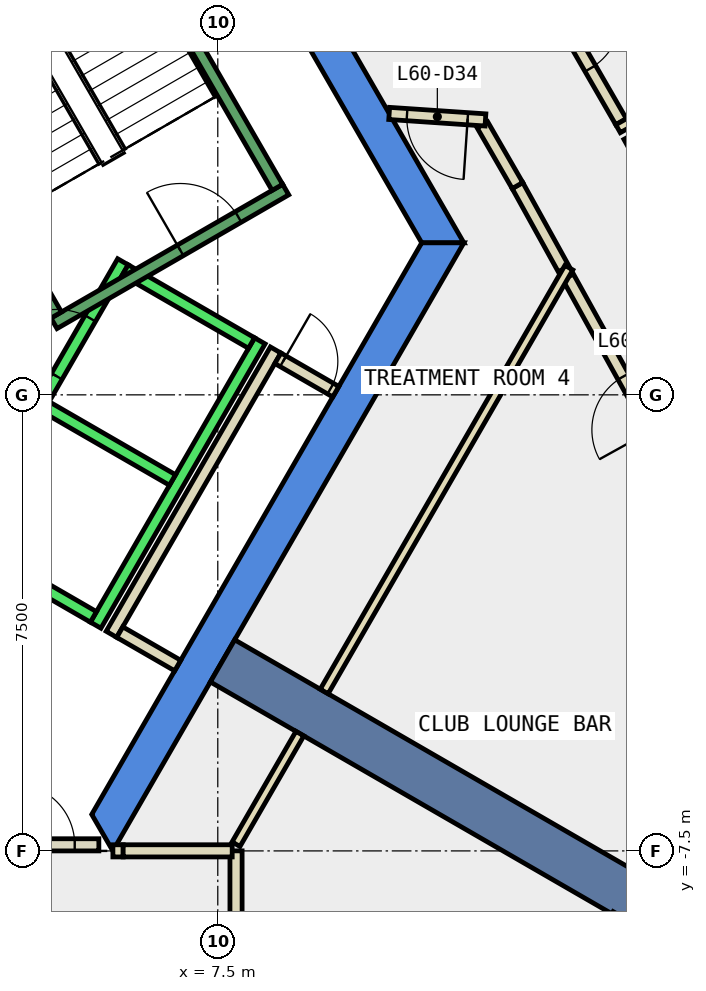
"""IFC4 building model, lengths in metres.
Left out: names, types, materials, properties, quantities, classifications, styles, units other than length and angle.
Written with IfcOpenShell. Run it as: python <this file> out.ifc"""

import sys

from ifc_helpers import new_model, si_unit, direction, frame, frame_2d, origin, place, context, subcontext, project, spatial, polyline, rectangle, outline, extrude, element, fill, save


model = new_model("IFC4")
c1 = context("Model", 3, precision=1e-05, world=origin(), true_north=direction((0.0, 1.0)))
c2 = subcontext(c1, "Body", "Model", "MODEL_VIEW")
j1 = project(units=[si_unit("LENGTHUNIT", "METRE"), si_unit("PLANEANGLEUNIT", "RADIAN")], contexts=[c1])
p1 = place(None, origin())
s1 = spatial("IfcSite", under=j1, at=p1, CompositionType="ELEMENT")
p2 = place(p1, origin())
s2 = spatial("IfcBuilding", under=s1, at=p2, CompositionType="ELEMENT")
p3 = place(p2, frame((0.0, 0.0, 263.0)))
s3 = spatial("IfcBuildingStorey", under=s2, at=p3, CompositionType="ELEMENT", Elevation=263.0)
p4 = place(p3, frame((0.0, 0.0, -0.34)))
e1 = element("IfcWall", 1, at=p4, inside=s3, PredefinedType="SHEAR", context=c2, shape_type="SweptSolid", body=[
    extrude(outline(polyline([(6.786, 10.747), (6.266, 10.447), (10.854, 2.5), (11.547, 2.5), (6.786, 10.747)])), origin(), (0.0, 0.0, 1.0), 3.6),
])
p5 = place(p3, frame((0.0, 0.0, -0.34)))
e2 = element("IfcWall", 2, at=p5, inside=s3, PredefinedType="SHEAR", context=c2, shape_type="SweptSolid", body=[
    extrude(outline(polyline([(5.774, -7.5), (11.547, 2.5), (10.854, 2.5), (5.427, -6.9), (5.774, -7.5)])), origin(), (0.0, 0.0, 1.0), 3.6),
])
p6 = place(p3, frame((7.578, -4.375, -0.34), z_axis=(0.0, 0.0, 1.0), x_axis=(0.866024315419, -0.5000018851, 0.0)))
e3 = element("IfcWall", 3, at=p6, inside=s3, PredefinedType="SHEAR", context=c2, shape_type="SweptSolid", body=[
    extrude(rectangle(XDim=9.0, YDim=0.8, at=frame_2d((4.5, 0.0))), origin(), (0.0, 0.0, 1.0), 3.6),
])
p7 = place(p3, frame((13.188, 2.071, 0.0), z_axis=(0.0, 0.0, 1.0), x_axis=(-0.484398936474, 0.874847226859, 0.0)))
e4 = element("IfcWall", 4, at=p7, inside=s3, PredefinedType="PARTITIONING", context=c2, shape_type="SweptSolid", body=[
    extrude(rectangle(XDim=1.567, YDim=0.2, at=frame_2d((0.783, 0.0))), origin(), (0.0, 0.0, 1.0), 3.26),
])
p8 = place(p3, frame((12.429, 3.442, 0.0), z_axis=(0.0, 0.0, 1.0), x_axis=(-0.500076612374, 0.865981167091, 0.0)))
e5 = element("IfcWall", 5, at=p8, inside=s3, PredefinedType="PARTITIONING", context=c2, shape_type="SweptSolid", body=[
    extrude(rectangle(XDim=1.154, YDim=0.2, at=frame_2d((0.577, 0.0))), origin(), (0.0, 0.0, 1.0), 3.26),
])
p9 = place(p3, frame((11.902, 4.521, 0.0), z_axis=(0.0, 0.0, 1.0), x_axis=(-0.997726217037, 0.067397298437, 0.0)))
e6 = element("IfcWall", 6, at=p9, inside=s3, PredefinedType="PARTITIONING", context=c2, shape_type="SweptSolid", body=[
    extrude(rectangle(XDim=1.587, YDim=0.2, at=frame_2d((0.793, 0.0))), origin(), (0.0, 0.0, 1.0), 3.26),
])
p10 = place(p9, frame((0.293, 0.0, 0.0)))
e7 = element("IfcOpeningElement", 7, at=p10, cuts=e6, PredefinedType="OPENING", context=c2, shape_type="SweptSolid", body=[
    extrude(rectangle(XDim=1.0, YDim=2.1, at=frame_2d((0.5, 1.05))), frame((0.0, 0.11, 0.0), z_axis=(0.0, -1.0, 0.0), x_axis=(1.0, 0.0, 0.0)), (0.0, 0.0, 1.0), 0.22),
])
p11 = place(p3, frame((15.56, -2.214, 0.0), z_axis=(0.0, 0.0, 1.0), x_axis=(-0.484323615817, 0.874888927329, 0.0)))
e8 = element("IfcWall", 8, at=p11, inside=s3, PredefinedType="PARTITIONING", context=c2, shape_type="SweptSolid", body=[
    extrude(rectangle(XDim=4.747, YDim=0.2, at=frame_2d((2.374, 0.0))), origin(), (0.0, 0.0, 1.0), 3.26),
])
p12 = place(p11, frame((1.874, 0.0, 0.0)))
e9 = element("IfcOpeningElement", 9, at=p12, cuts=e8, PredefinedType="OPENING", context=c2, shape_type="SweptSolid", body=[
    extrude(rectangle(XDim=1.0, YDim=2.1, at=frame_2d((0.5, 1.05))), frame((0.0, 0.11, 0.0), z_axis=(0.0, -1.0, 0.0), x_axis=(1.0, 0.0, 0.0)), (0.0, 0.0, 1.0), 0.22),
])
p13 = place(p3, frame((14.267, 4.25, 0.0), z_axis=(0.0, 0.0, 1.0), x_axis=(0.4843920198, -0.874851056554, 0.0)))
e10 = element("IfcWall", 10, at=p13, inside=s3, PredefinedType="PARTITIONING", context=c2, shape_type="SweptSolid", body=[
    extrude(rectangle(XDim=3.199, YDim=0.2, at=frame_2d((1.6, 0.0))), origin(), (0.0, 0.0, 1.0), 3.26),
])
p14 = place(p3, frame((12.62, 7.111, 0.0), z_axis=(0.0, 0.0, 1.0), x_axis=(0.499950733426, -0.866053845986, 0.0)))
e11 = element("IfcWall", 11, at=p14, inside=s3, PredefinedType="PARTITIONING", context=c2, shape_type="SweptSolid", body=[
    extrude(rectangle(XDim=3.024, YDim=0.2, at=frame_2d((1.512, 0.0))), origin(), (0.0, 0.0, 1.0), 3.26),
])
p15 = place(p14, frame((1.013, 0.0, 0.0)))
e12 = element("IfcOpeningElement", 12, at=p15, cuts=e11, PredefinedType="OPENING", context=c2, shape_type="SweptSolid", body=[
    extrude(rectangle(XDim=1.0, YDim=2.1, at=frame_2d((0.5, 1.05))), frame((0.0, 0.11, 0.0), z_axis=(0.0, -1.0, 0.0), x_axis=(1.0, 0.0, 0.0)), (0.0, 0.0, 1.0), 0.22),
])
p16 = place(p3, frame((5.751, -3.938, 0.0), z_axis=(0.0, 0.0, 1.0), x_axis=(0.500034260056, 0.866005622828, 0.0)))
e13 = element("IfcWall", 13, at=p16, inside=s3, PredefinedType="PARTITIONING", context=c2, shape_type="SweptSolid", body=[
    extrude(rectangle(XDim=5.399, YDim=0.2, at=frame_2d((2.7, 0.0))), origin(), (0.0, 0.0, 1.0), 3.26),
])
p17 = place(p3, frame((8.488, 0.602, 0.0), z_axis=(0.0, 0.0, 1.0), x_axis=(0.866063652425, -0.499933745558, 0.0)))
e14 = element("IfcWall", 14, at=p17, inside=s3, PredefinedType="PARTITIONING", context=c2, shape_type="SweptSolid", body=[
    extrude(rectangle(XDim=1.1, YDim=0.2, at=frame_2d((0.55, 0.0))), origin(), (0.0, 0.0, 1.0), 3.26),
])
p18 = place(p17, frame((0.1, 0.0, 0.0)))
e15 = element("IfcOpeningElement", 15, at=p18, cuts=e14, PredefinedType="OPENING", context=c2, shape_type="SweptSolid", body=[
    extrude(rectangle(XDim=0.9, YDim=2.1, at=frame_2d((0.45, 1.05))), frame((0.0, 0.11, 0.0), z_axis=(0.0, -1.0, 0.0), x_axis=(1.0, 0.0, 0.0)), (0.0, 0.0, 1.0), 0.22),
])
p19 = place(p3, frame((6.841, -4.452, 0.0), z_axis=(0.0, 0.0, 1.0), x_axis=(-0.86621513555, 0.499671230855, 0.0)))
e16 = element("IfcWall", 16, at=p19, inside=s3, PredefinedType="PARTITIONING", context=c2, shape_type="SweptSolid", body=[
    extrude(rectangle(XDim=1.1, YDim=0.2, at=frame_2d((0.55, 0.0))), origin(), (0.0, 0.0, 1.0), 3.26),
])
p20 = place(p3, frame((5.775, -7.499, 0.0), z_axis=(0.0, 0.0, 1.0), x_axis=(1.0, 0.0, 0.0)))
e17 = element("IfcWall", 17, at=p20, inside=s3, PredefinedType="PARTITIONING", context=c2, shape_type="SweptSolid", body=[
    extrude(rectangle(XDim=0.169, YDim=0.2, at=frame_2d((0.084, 0.0))), origin(), (0.0, 0.0, 1.0), 2.4),
])
p21 = place(p3, frame((7.8, -7.39, 0.0), z_axis=(0.0, 0.0, 1.0), x_axis=(0.499977374825, 0.866038466041, 0.0)))
e18 = element("IfcWall", 18, at=p21, inside=s3, PredefinedType="PARTITIONING", context=c2, shape_type="SweptSolid", body=[
    extrude(rectangle(XDim=2.1, YDim=0.15, at=frame_2d((1.05, 0.0))), origin(), (0.0, 0.0, 1.0), 3.26),
])
p22 = place(p3, frame((7.8, -7.499, 0.0), z_axis=(0.0, 0.0, 1.0), x_axis=(0.0, -1.0, 0.0)))
e19 = element("IfcWall", 19, at=p22, inside=s3, PredefinedType="PARTITIONING", context=c2, shape_type="SweptSolid", body=[
    extrude(rectangle(XDim=5.465, YDim=0.2, at=frame_2d((2.732, 0.0))), origin(), (0.0, 0.0, 1.0), 3.26),
])
p23 = place(p3, frame((14.067, -8.536, 0.0), z_axis=(0.0, 0.0, 1.0), x_axis=(-0.500100941679, -0.865967117235, 0.0)))
e20 = element("IfcWall", 20, at=p23, inside=s3, PredefinedType="PARTITIONING", context=c2, shape_type="SweptSolid", body=[
    extrude(rectangle(XDim=4.951, YDim=0.15, at=frame_2d((2.475, 0.0))), origin(), (0.0, 0.0, 1.0), 3.26),
])
p24 = place(p3, frame((14.083, 4.377, 0.0), z_axis=(0.0, 0.0, 1.0), x_axis=(0.870415885751, 0.492317159799, 0.0)))
e21 = element("IfcWall", 21, at=p24, inside=s3, PredefinedType="PARTITIONING", context=c2, shape_type="SweptSolid", body=[
    extrude(rectangle(XDim=4.581, YDim=0.15, at=frame_2d((2.29, 0.0))), origin(), (0.0, 0.0, 1.0), 3.26),
])
p25 = place(p3, frame((3.75, -7.4, 0.0), z_axis=(0.0, 0.0, 1.0), x_axis=(1.0, 0.0, 0.0)))
e22 = element("IfcWall", 22, at=p25, inside=s3, PredefinedType="PARTITIONING", context=c2, shape_type="SweptSolid", body=[
    extrude(rectangle(XDim=1.794, YDim=0.2, at=frame_2d((0.897, 0.0))), origin(), (0.0, 0.0, 1.0), 2.4),
])
p26 = place(p25, frame((0.397, 0.0, 0.0)))
e23 = element("IfcOpeningElement", 23, at=p26, cuts=e22, PredefinedType="OPENING", context=c2, shape_type="SweptSolid", body=[
    extrude(rectangle(XDim=1.0, YDim=2.1, at=frame_2d((0.5, 1.05))), frame((0.0, 0.11, 0.0), z_axis=(0.0, -1.0, 0.0), x_axis=(1.0, 0.0, 0.0)), (0.0, 0.0, 1.0), 0.22),
])
p27 = place(p3, frame((9.25, -4.878, 0.0), z_axis=(0.0, 0.0, 1.0), x_axis=(0.499982416899, 0.866035555154, 0.0)))
e24 = element("IfcWall", 24, at=p27, inside=s3, PredefinedType="PARTITIONING", context=c2, shape_type="SweptSolid", body=[
    extrude(rectangle(XDim=8.048, YDim=0.15, at=frame_2d((4.024, 0.0))), origin(), (0.0, 0.0, 1.0), 3.26),
])
p28 = place(p3, frame((5.944, -7.499, 0.0), z_axis=(0.0, 0.0, 1.0), x_axis=(1.0, 0.0, 0.0)))
e25 = element("IfcWall", 25, at=p28, inside=s3, PredefinedType="PARTITIONING", context=c2, shape_type="SweptSolid", body=[
    extrude(rectangle(XDim=1.793, YDim=0.2, at=frame_2d((0.896, 0.0))), origin(), (0.0, 0.0, 1.0), 3.26),
])
p29 = place(p3, frame((3.24, -2.488, 0.0), z_axis=(0.0, 0.0, 1.0), x_axis=(0.500034260056, 0.866005622828, 0.0)))
e26 = element("IfcWall", 26, at=p29, inside=s3, PredefinedType="STANDARD", context=c2, shape_type="SweptSolid", body=[
    extrude(rectangle(XDim=5.399, YDim=0.2, at=frame_2d((2.7, 0.0))), origin(), (0.0, 0.0, 1.0), 3.26),
])
p30 = place(p29, frame((3.225, 0.0, 0.0)))
e27 = element("IfcOpeningElement", 27, at=p30, cuts=e26, PredefinedType="OPENING", context=c2, shape_type="SweptSolid", body=[
    extrude(rectangle(XDim=1.1, YDim=2.1, at=frame_2d((0.55, 1.05))), frame((0.0, 0.11, 0.0), z_axis=(0.0, -1.0, 0.0), x_axis=(1.0, 0.0, 0.0)), (0.0, 0.0, 1.0), 0.22),
])
p31 = place(p29, frame((1.225, 0.0, 0.0)))
e28 = element("IfcOpeningElement", 28, at=p31, cuts=e26, PredefinedType="OPENING", context=c2, shape_type="SweptSolid", body=[
    extrude(rectangle(XDim=1.1, YDim=2.1, at=frame_2d((0.55, 1.05))), frame((0.0, 0.11, 0.0), z_axis=(0.0, -1.0, 0.0), x_axis=(1.0, 0.0, 0.0)), (0.0, 0.0, 1.0), 0.22),
])
p32 = place(p3, frame((5.492, -3.788, 0.0), z_axis=(0.0, 0.0, 1.0), x_axis=(0.500034260056, 0.866005622828, 0.0)))
e29 = element("IfcWall", 29, at=p32, inside=s3, PredefinedType="STANDARD", context=c2, shape_type="SweptSolid", body=[
    extrude(rectangle(XDim=5.399, YDim=0.2, at=frame_2d((2.7, 0.0))), origin(), (0.0, 0.0, 1.0), 3.26),
])
p33 = place(p3, frame((3.377, -2.452, 0.0), z_axis=(0.0, 0.0, 1.0), x_axis=(0.865955154139, -0.50012165622, 0.0)))
e30 = element("IfcWall", 30, at=p33, inside=s3, PredefinedType="STANDARD", context=c2, shape_type="SweptSolid", body=[
    extrude(rectangle(XDim=2.4, YDim=0.2, at=frame_2d((1.2, 0.0))), origin(), (0.0, 0.0, 1.0), 3.26),
])
for number, where, z_axis, x_axis in (
    (31, (4.677, -0.2, 0.0), (0.0, 0.0, 1.0), (0.866, -0.5, 0.0)),
    (32, (5.977, 2.052, 0.0), (0.0, 0.0, 1.0), (0.866, -0.5, 0.0)),
):
    element("IfcWall", number, at=place(p3, frame(where, z_axis=z_axis, x_axis=x_axis)), inside=s3, PredefinedType="STANDARD", context=c2, shape_type="SweptSolid", body=[
        extrude(rectangle(XDim=2.399, YDim=0.2, at=frame_2d((1.2, 0.0))), origin(), (0.0, 0.0, 1.0), 3.26),
    ])
p34 = place(p3, frame((4.806, 1.176, 0.0), z_axis=(0.0, 0.0, 1.0), x_axis=(0.866059941101, 0.499940174841, 0.0)))
e33 = element("IfcWall", 33, at=p34, inside=s3, PredefinedType="STANDARD", context=c2, shape_type="SweptSolid", body=[
    extrude(rectangle(XDim=4.4, YDim=0.2, at=frame_2d((2.2, 0.0))), origin(), (0.0, 0.0, 1.0), 3.26),
])
p35 = place(p34, frame((2.4, 0.0, 0.0)))
e34 = element("IfcOpeningElement", 34, at=p35, cuts=e33, PredefinedType="OPENING", context=c2, shape_type="SweptSolid", body=[
    extrude(rectangle(XDim=1.1, YDim=2.2, at=frame_2d((0.55, 1.1))), frame((0.0, 0.11, 0.0), z_axis=(0.0, -1.0, 0.0), x_axis=(1.0, 0.0, 0.0)), (0.0, 0.0, 1.0), 0.22),
])
p36 = place(p3, frame((4.843, 1.312, 0.0), z_axis=(0.0, 0.0, 1.0), x_axis=(-0.499963383562, 0.866046543262, 0.0)))
e35 = element("IfcWall", 35, at=p36, inside=s3, PredefinedType="STANDARD", context=c2, shape_type="SweptSolid", body=[
    extrude(rectangle(XDim=6.9, YDim=0.2, at=frame_2d((3.45, 0.0))), origin(), (0.0, 0.0, 1.0), 3.26),
])
p37 = place(p36, frame((0.45, 0.0, 0.0)))
e36 = element("IfcOpeningElement", 36, at=p37, cuts=e35, PredefinedType="OPENING", context=c2, shape_type="SweptSolid", body=[
    extrude(rectangle(XDim=1.1, YDim=2.2, at=frame_2d((0.55, 1.1))), frame((0.0, 0.11, 0.0), z_axis=(0.0, -1.0, 0.0), x_axis=(1.0, 0.0, 0.0)), (0.0, 0.0, 1.0), 0.22),
])
p38 = place(p3, frame((8.48, 3.412, 0.0), z_axis=(0.0, 0.0, 1.0), x_axis=(-0.499978703459, 0.866037698999, 0.0)))
e37 = element("IfcWall", 37, at=p38, inside=s3, PredefinedType="STANDARD", context=c2, shape_type="SweptSolid", body=[
    extrude(rectangle(XDim=6.9, YDim=0.2, at=frame_2d((3.45, 0.0))), origin(), (0.0, 0.0, 1.0), 3.26),
])
p39 = place(p15, origin())
e38 = element("IfcDoor", 38, at=p39, inside=s3, OperationType="SINGLE_SWING_LEFT", PredefinedType="DOOR", context=c2, shape_type="SweptSolid", body=[
    extrude(rectangle(XDim=1.0, YDim=2.1, at=frame_2d((0.5, 1.05))), frame((0.0, 0.025, 0.0), z_axis=(0.0, -1.0, 0.0), x_axis=(1.0, 0.0, 0.0)), (0.0, 0.0, 1.0), 0.05),
])
fill(e12, e38)
p40 = place(p12, origin())
e39 = element("IfcDoor", 39, at=p40, inside=s3, OperationType="SINGLE_SWING_LEFT", PredefinedType="DOOR", context=c2, shape_type="SweptSolid", body=[
    extrude(rectangle(XDim=1.0, YDim=2.1, at=frame_2d((0.5, 1.05))), frame((0.0, 0.025, 0.0), z_axis=(0.0, -1.0, 0.0), x_axis=(1.0, 0.0, 0.0)), (0.0, 0.0, 1.0), 0.05),
])
fill(e9, e39)
p41 = place(p10, origin())
e40 = element("IfcDoor", 40, at=p41, inside=s3, OperationType="SINGLE_SWING_LEFT", PredefinedType="DOOR", context=c2, shape_type="SweptSolid", body=[
    extrude(rectangle(XDim=1.0, YDim=2.1, at=frame_2d((0.5, 1.05))), frame((0.0, 0.025, 0.0), z_axis=(0.0, -1.0, 0.0), x_axis=(1.0, 0.0, 0.0)), (0.0, 0.0, 1.0), 0.05),
])
fill(e7, e40)
p42 = place(p18, origin())
e41 = element("IfcDoor", 41, at=p42, inside=s3, OperationType="SINGLE_SWING_RIGHT", PredefinedType="DOOR", context=c2, shape_type="SweptSolid", body=[
    extrude(rectangle(XDim=0.9, YDim=2.1, at=frame_2d((0.45, 1.05))), frame((0.0, 0.025, 0.0), z_axis=(0.0, -1.0, 0.0), x_axis=(1.0, 0.0, 0.0)), (0.0, 0.0, 1.0), 0.05),
])
fill(e15, e41)
p43 = place(p26, origin())
e42 = element("IfcDoor", 42, at=p43, inside=s3, OperationType="SINGLE_SWING_LEFT", PredefinedType="DOOR", context=c2, shape_type="SweptSolid", body=[
    extrude(rectangle(XDim=1.0, YDim=2.1, at=frame_2d((0.5, 1.05))), frame((0.0, 0.025, 0.0), z_axis=(0.0, -1.0, 0.0), x_axis=(1.0, 0.0, 0.0)), (0.0, 0.0, 1.0), 0.05),
])
fill(e23, e42)
p44 = place(p30, origin())
e43 = element("IfcDoor", 43, at=p44, inside=s3, OperationType="SLIDING_TO_LEFT", PredefinedType="DOOR", context=c2, shape_type="SweptSolid", body=[
    extrude(rectangle(XDim=1.1, YDim=2.1, at=frame_2d((0.55, 1.05))), frame((0.0, 0.025, 0.0), z_axis=(0.0, -1.0, 0.0), x_axis=(1.0, 0.0, 0.0)), (0.0, 0.0, 1.0), 0.05),
])
fill(e27, e43)
p45 = place(p35, origin())
e44 = element("IfcDoor", 44, at=p45, inside=s3, OperationType="SINGLE_SWING_LEFT", PredefinedType="DOOR", context=c2, shape_type="SweptSolid", body=[
    extrude(rectangle(XDim=1.1, YDim=2.2, at=frame_2d((0.55, 1.1))), frame((0.0, 0.025, 0.0), z_axis=(0.0, -1.0, 0.0), x_axis=(1.0, 0.0, 0.0)), (0.0, 0.0, 1.0), 0.05),
])
fill(e34, e44)
save(model, sys.argv[1])
